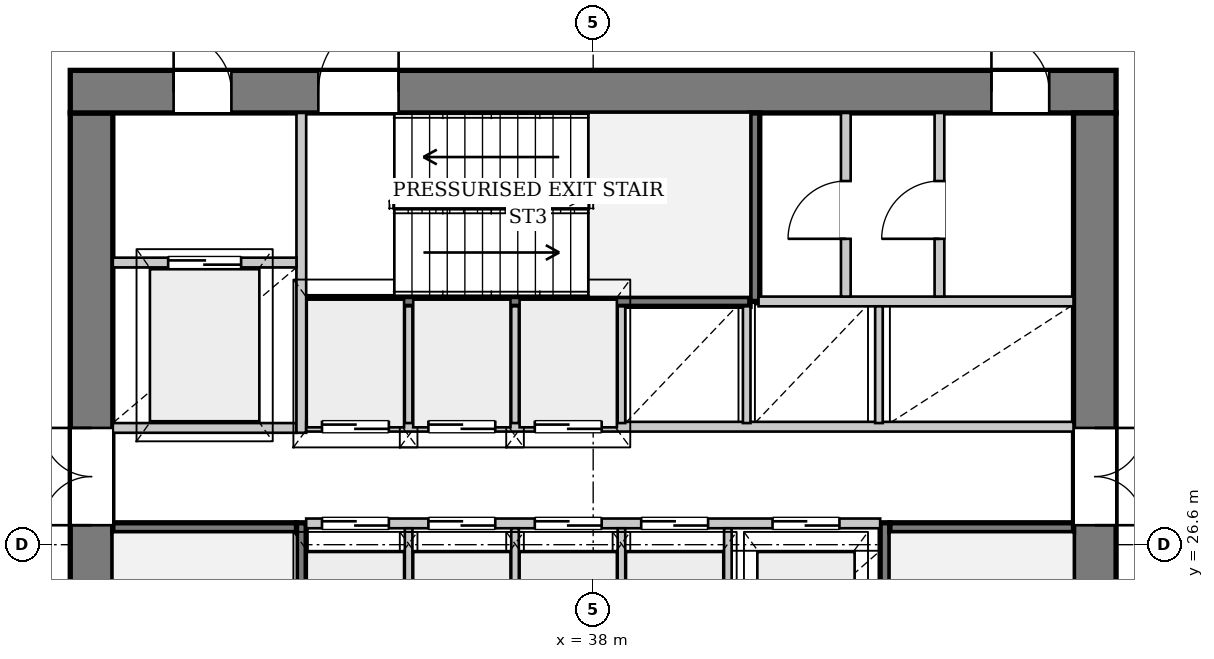
"""IFC4 building model, lengths in metres.
Left out: names, types, materials, properties, quantities, classifications, styles, units other than length and angle.
Written with IfcOpenShell. Run it as: python <this file> out.ifc"""

import sys

from ifc_helpers import new_model, si_unit, direction, frame, frame_2d, origin, place, context, subcontext, project, spatial, rectangle, extrude, source, transform, mapped, element, fill, save


model = new_model("IFC4")
c1 = context("Model", 3, precision=1e-05, world=origin(), true_north=direction((0.0, 1.0)))
c2 = subcontext(c1, "Body", "Model", "MODEL_VIEW")
j1 = project(units=[si_unit("LENGTHUNIT", "METRE"), si_unit("PLANEANGLEUNIT", "RADIAN")], contexts=[c1])
p1 = place(None, origin())
s1 = spatial("IfcSite", under=j1, at=p1, CompositionType="ELEMENT")
p2 = place(p1, origin())
s2 = spatial("IfcBuilding", under=s1, at=p2, CompositionType="ELEMENT")
p3 = place(p2, frame((0.0, 0.0, 134.1)))
s3 = spatial("IfcBuildingStorey", under=s2, at=p3, CompositionType="ELEMENT", Elevation=134.1)
p4 = place(p3, frame((29.75, 19.5, 0.0), z_axis=(0.0, 0.0, 1.0), x_axis=(0.0, 1.0, 0.0)))
e1 = element("IfcWall", 1, at=p4, inside=s3, PredefinedType="SHEAR", context=c2, shape_type="SweptSolid", body=[
    extrude(rectangle(XDim=14.2, YDim=0.7, at=frame_2d((7.1, 0.0))), origin(), (0.0, 0.0, 1.0), 3.75),
])
p5 = place(p4, frame((7.42, 0.0, 0.0)))
e2 = element("IfcOpeningElement", 2, at=p5, cuts=e1, PredefinedType="OPENING", context=c2, shape_type="SweptSolid", body=[
    extrude(rectangle(XDim=1.6, YDim=2.2, at=frame_2d((0.8, 1.1))), frame((0.0, 0.36, 0.0), z_axis=(0.0, -1.0, 0.0), x_axis=(1.0, 0.0, 0.0)), (0.0, 0.0, 1.0), 0.72),
])
p6 = place(p3, frame((29.4, 34.05, 0.0), z_axis=(0.0, 0.0, 1.0), x_axis=(1.0, 0.0, 0.0)))
e3 = element("IfcWall", 3, at=p6, inside=s3, PredefinedType="SHEAR", context=c2, shape_type="SweptSolid", body=[
    extrude(rectangle(XDim=17.2, YDim=0.7, at=frame_2d((8.6, 0.0))), origin(), (0.0, 0.0, 1.0), 3.75),
])
p7 = place(p6, frame((1.7, 0.0, 0.0)))
e4 = element("IfcOpeningElement", 4, at=p7, cuts=e3, PredefinedType="OPENING", context=c2, shape_type="SweptSolid", body=[
    extrude(rectangle(XDim=0.95, YDim=2.1, at=frame_2d((0.475, 1.05))), frame((0.0, 0.36, 0.0), z_axis=(0.0, -1.0, 0.0), x_axis=(1.0, 0.0, 0.0)), (0.0, 0.0, 1.0), 0.72),
])
p8 = place(p6, frame((4.08, 0.0, 0.0)))
e5 = element("IfcOpeningElement", 5, at=p8, cuts=e3, PredefinedType="OPENING", context=c2, shape_type="SweptSolid", body=[
    extrude(rectangle(XDim=1.32, YDim=2.2, at=frame_2d((0.66, 1.1))), frame((0.0, 0.36, 0.0), z_axis=(0.0, -1.0, 0.0), x_axis=(1.0, 0.0, 0.0)), (0.0, 0.0, 1.0), 0.72),
])
p9 = place(p6, frame((15.15, 0.0, 0.0)))
e6 = element("IfcOpeningElement", 6, at=p9, cuts=e3, PredefinedType="OPENING", context=c2, shape_type="SweptSolid", body=[
    extrude(rectangle(XDim=0.95, YDim=2.1, at=frame_2d((0.475, 1.05))), frame((0.0, 0.36, 0.0), z_axis=(0.0, -1.0, 0.0), x_axis=(1.0, 0.0, 0.0)), (0.0, 0.0, 1.0), 0.72),
])
p10 = place(p3, frame((46.25, 33.7, 0.0), z_axis=(0.0, 0.0, 1.0), x_axis=(0.0, -1.0, 0.0)))
e7 = element("IfcWall", 7, at=p10, inside=s3, PredefinedType="SHEAR", context=c2, shape_type="SweptSolid", body=[
    extrude(rectangle(XDim=14.2, YDim=0.7, at=frame_2d((7.1, 0.0))), origin(), (0.0, 0.0, 1.0), 3.75),
])
p11 = place(p10, frame((5.18, 0.0, 0.0)))
e8 = element("IfcOpeningElement", 8, at=p11, cuts=e7, PredefinedType="OPENING", context=c2, shape_type="SweptSolid", body=[
    extrude(rectangle(XDim=1.6, YDim=2.2, at=frame_2d((0.8, 1.1))), frame((0.0, 0.36, 0.0), z_axis=(0.0, -1.0, 0.0), x_axis=(1.0, 0.0, 0.0)), (0.0, 0.0, 1.0), 0.72),
])
p12 = place(p3, frame((33.2, 19.5, 0.0), z_axis=(0.0, 0.0, 1.0), x_axis=(0.0, 1.0, 0.0)))
e9 = element("IfcWall", 9, at=p12, inside=s3, PredefinedType="PARTITIONING", context=c2, shape_type="SweptSolid", body=[
    extrude(rectangle(XDim=7.46, YDim=0.16, at=frame_2d((3.73, 0.0))), origin(), (0.0, 0.0, 1.0), 3.75),
])
p13 = place(p12, frame((0.08, 0.0, 0.0)))
e10 = element("IfcOpeningElement", 10, at=p13, cuts=e9, PredefinedType="OPENING", context=c2, shape_type="SweptSolid", body=[
    extrude(rectangle(XDim=1.32, YDim=2.2, at=frame_2d((0.66, 1.1))), frame((0.0, 0.09, 0.0), z_axis=(0.0, -1.0, 0.0), x_axis=(1.0, 0.0, 0.0)), (0.0, 0.0, 1.0), 0.18),
])
p14 = place(p3, frame((30.1, 26.88, 0.0), z_axis=(0.0, 0.0, 1.0), x_axis=(1.0, 0.0, 0.0)))
e11 = element("IfcWall", 11, at=p14, inside=s3, PredefinedType="PARTITIONING", context=c2, shape_type="SweptSolid", body=[
    extrude(rectangle(XDim=3.02, YDim=0.16, at=frame_2d((1.51, 0.0))), origin(), (0.0, 0.0, 1.0), 3.75),
])
p15 = place(p3, frame((42.8, 26.96, 0.0), z_axis=(0.0, 0.0, 1.0), x_axis=(0.0, -1.0, 0.0)))
e12 = element("IfcWall", 12, at=p15, inside=s3, PredefinedType="PARTITIONING", context=c2, shape_type="SweptSolid", body=[
    extrude(rectangle(XDim=7.46, YDim=0.16, at=frame_2d((3.73, 0.0))), origin(), (0.0, 0.0, 1.0), 3.75),
])
p16 = place(p15, frame((6.06, 0.0, 0.0)))
e13 = element("IfcOpeningElement", 13, at=p16, cuts=e12, PredefinedType="OPENING", context=c2, shape_type="SweptSolid", body=[
    extrude(rectangle(XDim=1.32, YDim=2.2, at=frame_2d((0.66, 1.1))), frame((0.0, 0.09, 0.0), z_axis=(0.0, -1.0, 0.0), x_axis=(1.0, 0.0, 0.0)), (0.0, 0.0, 1.0), 0.18),
])
p17 = place(p3, frame((42.88, 26.88, 0.0), z_axis=(0.0, 0.0, 1.0), x_axis=(1.0, 0.0, 0.0)))
e14 = element("IfcWall", 14, at=p17, inside=s3, PredefinedType="PARTITIONING", context=c2, shape_type="SweptSolid", body=[
    extrude(rectangle(XDim=3.02, YDim=0.16, at=frame_2d((1.51, 0.0))), origin(), (0.0, 0.0, 1.0), 3.75),
])
p18 = place(p3, frame((33.28, 30.6, 0.0), z_axis=(0.0, 0.0, 1.0), x_axis=(1.0, 0.0, 0.0)))
e15 = element("IfcWall", 15, at=p18, inside=s3, PredefinedType="PARTITIONING", context=c2, shape_type="SweptSolid", body=[
    extrude(rectangle(XDim=7.3, YDim=0.16, at=frame_2d((3.65, 0.0))), origin(), (0.0, 0.0, 1.0), 3.75),
])
p19 = place(p3, frame((40.66, 30.6, 0.0), z_axis=(0.0, 0.0, 1.0), x_axis=(0.0, 1.0, 0.0)))
e16 = element("IfcWall", 16, at=p19, inside=s3, PredefinedType="PARTITIONING", context=c2, shape_type="SweptSolid", body=[
    extrude(rectangle(XDim=3.1, YDim=0.16, at=frame_2d((1.55, 0.0))), origin(), (0.0, 0.0, 1.0), 3.75),
])
p20 = place(p3, frame((30.1, 28.52, 0.0), z_axis=(0.0, 0.0, 1.0), x_axis=(1.0, 0.0, 0.0)))
e17 = element("IfcWall", 17, at=p20, inside=s3, PredefinedType="PARTITIONING", context=c2, shape_type="SweptSolid", body=[
    extrude(rectangle(XDim=3.02, YDim=0.16, at=frame_2d((1.51, 0.0))), origin(), (0.0, 0.0, 1.0), 3.75),
])
p21 = place(p3, frame((33.2, 28.44, 0.0), z_axis=(0.0, 0.0, 1.0), x_axis=(0.0, 1.0, 0.0)))
e18 = element("IfcWall", 18, at=p21, inside=s3, PredefinedType="PARTITIONING", context=c2, shape_type="SweptSolid", body=[
    extrude(rectangle(XDim=5.26, YDim=0.16, at=frame_2d((2.63, 0.0))), origin(), (0.0, 0.0, 1.0), 3.75),
])
p22 = place(p3, frame((30.1, 31.24, 0.0), z_axis=(0.0, 0.0, 1.0), x_axis=(1.0, 0.0, 0.0)))
e19 = element("IfcWall", 19, at=p22, inside=s3, PredefinedType="PARTITIONING", context=c2, shape_type="SweptSolid", body=[
    extrude(rectangle(XDim=3.02, YDim=0.16, at=frame_2d((1.51, 0.0))), origin(), (0.0, 0.0, 1.0), 3.75),
])
p23 = place(p22, frame((0.91, 0.0, 0.0)))
e20 = element("IfcOpeningElement", 20, at=p23, cuts=e19, PredefinedType="OPENING", context=c2, shape_type="SweptSolid", body=[
    extrude(rectangle(XDim=1.2, YDim=2.2, at=frame_2d((0.6, 1.1))), frame((0.0, 0.09, 0.0), z_axis=(0.0, -1.0, 0.0), x_axis=(1.0, 0.0, 0.0)), (0.0, 0.0, 1.0), 0.18),
])
p24 = place(p3, frame((33.28, 26.95, 0.0), z_axis=(0.0, 0.0, 1.0), x_axis=(1.0, 0.0, 0.0)))
e21 = element("IfcWall", 21, at=p24, inside=s3, PredefinedType="PARTITIONING", context=c2, shape_type="SweptSolid", body=[
    extrude(rectangle(XDim=9.44, YDim=0.16, at=frame_2d((4.72, 0.0))), origin(), (0.0, 0.0, 1.0), 3.75),
])
p25 = place(p24, frame((0.26, 0.0, 0.0)))
e22 = element("IfcOpeningElement", 22, at=p25, cuts=e21, PredefinedType="OPENING", context=c2, shape_type="SweptSolid", body=[
    extrude(rectangle(XDim=1.1, YDim=2.2, at=frame_2d((0.55, 1.1))), frame((0.0, 0.09, 0.0), z_axis=(0.0, -1.0, 0.0), x_axis=(1.0, 0.0, 0.0)), (0.0, 0.0, 1.0), 0.18),
])
p26 = place(p24, frame((2.01, 0.0, 0.0)))
e23 = element("IfcOpeningElement", 23, at=p26, cuts=e21, PredefinedType="OPENING", context=c2, shape_type="SweptSolid", body=[
    extrude(rectangle(XDim=1.1, YDim=2.2, at=frame_2d((0.55, 1.1))), frame((0.0, 0.09, 0.0), z_axis=(0.0, -1.0, 0.0), x_axis=(1.0, 0.0, 0.0)), (0.0, 0.0, 1.0), 0.18),
])
p27 = place(p24, frame((3.76, 0.0, 0.0)))
e24 = element("IfcOpeningElement", 24, at=p27, cuts=e21, PredefinedType="OPENING", context=c2, shape_type="SweptSolid", body=[
    extrude(rectangle(XDim=1.1, YDim=2.2, at=frame_2d((0.55, 1.1))), frame((0.0, 0.09, 0.0), z_axis=(0.0, -1.0, 0.0), x_axis=(1.0, 0.0, 0.0)), (0.0, 0.0, 1.0), 0.18),
])
p28 = place(p24, frame((5.51, 0.0, 0.0)))
e25 = element("IfcOpeningElement", 25, at=p28, cuts=e21, PredefinedType="OPENING", context=c2, shape_type="SweptSolid", body=[
    extrude(rectangle(XDim=1.1, YDim=2.2, at=frame_2d((0.55, 1.1))), frame((0.0, 0.09, 0.0), z_axis=(0.0, -1.0, 0.0), x_axis=(1.0, 0.0, 0.0)), (0.0, 0.0, 1.0), 0.18),
])
p29 = place(p24, frame((7.67, 0.0, 0.0)))
e26 = element("IfcOpeningElement", 26, at=p29, cuts=e21, PredefinedType="OPENING", context=c2, shape_type="SweptSolid", body=[
    extrude(rectangle(XDim=1.1, YDim=2.2, at=frame_2d((0.55, 1.1))), frame((0.0, 0.09, 0.0), z_axis=(0.0, -1.0, 0.0), x_axis=(1.0, 0.0, 0.0)), (0.0, 0.0, 1.0), 0.18),
])
for number, where, z_axis, x_axis in (
    (27, (34.965, 24.56, 0.0), (0.0, 0.0, 1.0), (0.0, 1.0, 0.0)),
    (28, (36.715, 24.56, 0.0), (0.0, 0.0, 1.0), (0.0, 1.0, 0.0)),
    (29, (38.465, 24.56, 0.0), (0.0, 0.0, 1.0), (0.0, 1.0, 0.0)),
    (30, (40.215, 24.56, 0.0), (0.0, 0.0, 1.0), (0.0, 1.0, 0.0)),
):
    element("IfcWall", number, at=place(p3, frame(where, z_axis=z_axis, x_axis=x_axis)), inside=s3, PredefinedType="PARTITIONING", context=c2, shape_type="SweptSolid", body=[
        extrude(rectangle(XDim=2.31, YDim=0.125, at=frame_2d((1.155, 0.0))), origin(), (0.0, 0.0, 1.0), 3.75),
    ])
p30 = place(p3, frame((33.28, 28.54, 0.0), z_axis=(0.0, 0.0, 1.0), x_axis=(1.0, 0.0, 0.0)))
e31 = element("IfcWall", 31, at=p30, inside=s3, PredefinedType="PARTITIONING", context=c2, shape_type="SweptSolid", body=[
    extrude(rectangle(XDim=12.62, YDim=0.16, at=frame_2d((6.31, 0.0))), origin(), (0.0, 0.0, 1.0), 3.75),
])
p31 = place(p30, frame((0.26, 0.0, 0.0)))
e32 = element("IfcOpeningElement", 32, at=p31, cuts=e31, PredefinedType="OPENING", context=c2, shape_type="SweptSolid", body=[
    extrude(rectangle(XDim=1.1, YDim=2.2, at=frame_2d((0.55, 1.1))), frame((0.0, 0.09, 0.0), z_axis=(0.0, -1.0, 0.0), x_axis=(1.0, 0.0, 0.0)), (0.0, 0.0, 1.0), 0.18),
])
p32 = place(p30, frame((2.01, 0.0, 0.0)))
e33 = element("IfcOpeningElement", 33, at=p32, cuts=e31, PredefinedType="OPENING", context=c2, shape_type="SweptSolid", body=[
    extrude(rectangle(XDim=1.1, YDim=2.2, at=frame_2d((0.55, 1.1))), frame((0.0, 0.09, 0.0), z_axis=(0.0, -1.0, 0.0), x_axis=(1.0, 0.0, 0.0)), (0.0, 0.0, 1.0), 0.18),
])
p33 = place(p30, frame((3.76, 0.0, 0.0)))
e34 = element("IfcOpeningElement", 34, at=p33, cuts=e31, PredefinedType="OPENING", context=c2, shape_type="SweptSolid", body=[
    extrude(rectangle(XDim=1.1, YDim=2.2, at=frame_2d((0.55, 1.1))), frame((0.0, 0.09, 0.0), z_axis=(0.0, -1.0, 0.0), x_axis=(1.0, 0.0, 0.0)), (0.0, 0.0, 1.0), 0.18),
])
p34 = place(p3, frame((40.72, 30.6, 0.0), z_axis=(0.0, 0.0, 1.0), x_axis=(1.0, 0.0, 0.0)))
e35 = element("IfcWall", 35, at=p34, inside=s3, PredefinedType="PARTITIONING", context=c2, shape_type="SweptSolid", body=[
    extrude(rectangle(XDim=5.18, YDim=0.16, at=frame_2d((2.59, 0.0))), origin(), (0.0, 0.0, 1.0), 3.75),
])
for number, where, z_axis, x_axis in (
    (36, (34.965, 28.6, 0.0), (0.0, 0.0, 1.0), (0.0, 1.0, 0.0)),
    (37, (36.715, 28.6, 0.0), (0.0, 0.0, 1.0), (0.0, 1.0, 0.0)),
    (38, (38.465, 28.6, 0.0), (0.0, 0.0, 1.0), (0.0, 1.0, 0.0)),
    (39, (40.525, 28.6, 0.0), (0.0, 0.0, 1.0), (0.0, 1.0, 0.0)),
    (40, (42.7, 28.6, 0.0), (0.0, 0.0, 1.0), (0.0, 1.0, 0.0)),
):
    element("IfcWall", number, at=place(p3, frame(where, z_axis=z_axis, x_axis=x_axis)), inside=s3, PredefinedType="PARTITIONING", context=c2, shape_type="SweptSolid", body=[
        extrude(rectangle(XDim=1.92, YDim=0.125, at=frame_2d((0.96, 0.0))), origin(), (0.0, 0.0, 1.0), 3.75),
    ])
p35 = place(p3, frame((42.155, 30.68, 0.0), z_axis=(0.0, 0.0, 1.0), x_axis=(0.0, 1.0, 0.0)))
e41 = element("IfcWall", 41, at=p35, inside=s3, PredefinedType="PARTITIONING", context=c2, shape_type="SweptSolid", body=[
    extrude(rectangle(XDim=3.02, YDim=0.16, at=frame_2d((1.51, 0.0))), origin(), (0.0, 0.0, 1.0), 3.75),
])
p36 = place(p35, frame((0.95, 0.0, 0.0)))
e42 = element("IfcOpeningElement", 42, at=p36, cuts=e41, PredefinedType="OPENING", context=c2, shape_type="SweptSolid", body=[
    extrude(rectangle(XDim=0.95, YDim=2.1, at=frame_2d((0.475, 1.05))), frame((0.0, 0.09, 0.0), z_axis=(0.0, -1.0, 0.0), x_axis=(1.0, 0.0, 0.0)), (0.0, 0.0, 1.0), 0.18),
])
p37 = place(p3, frame((43.695, 30.68, 0.0), z_axis=(0.0, 0.0, 1.0), x_axis=(0.0, 1.0, 0.0)))
e43 = element("IfcWall", 43, at=p37, inside=s3, PredefinedType="PARTITIONING", context=c2, shape_type="SweptSolid", body=[
    extrude(rectangle(XDim=3.02, YDim=0.16, at=frame_2d((1.51, 0.0))), origin(), (0.0, 0.0, 1.0), 3.75),
])
p38 = place(p37, frame((0.95, 0.0, 0.0)))
e44 = element("IfcOpeningElement", 44, at=p38, cuts=e43, PredefinedType="OPENING", context=c2, shape_type="SweptSolid", body=[
    extrude(rectangle(XDim=0.95, YDim=2.1, at=frame_2d((0.475, 1.05))), frame((0.0, 0.09, 0.0), z_axis=(0.0, -1.0, 0.0), x_axis=(1.0, 0.0, 0.0)), (0.0, 0.0, 1.0), 0.18),
])
m1 = source(origin(), c2, "Body", "SweptSolid", [
    extrude(rectangle(XDim=1.6, YDim=2.2, at=frame_2d((0.8, 1.1))), frame((0.0, 0.025, 0.0), z_axis=(0.0, -1.0, 0.0), x_axis=(1.0, 0.0, 0.0)), (0.0, 0.0, 1.0), 0.05),
])
p39 = place(p5, origin())
e45 = element("IfcDoor", 45, at=p39, inside=s3, OperationType="DOUBLE_DOOR_SINGLE_SWING", PredefinedType="DOOR", context=c2, shape_type="MappedRepresentation", body=[
    mapped(m1, transform((0.0, 0.0, 0.0), x_axis=(1.0, 0.0, 0.0), y_axis=(0.0, 1.0, 0.0), z_axis=(0.0, 0.0, 1.0), scale=1.0)),
])
fill(e2, e45)
m2 = source(origin(), c2, "Body", "SweptSolid", [
    extrude(rectangle(XDim=0.95, YDim=2.1, at=frame_2d((0.475, 1.05))), frame((0.0, 0.025, 0.0), z_axis=(0.0, -1.0, 0.0), x_axis=(1.0, 0.0, 0.0)), (0.0, 0.0, 1.0), 0.05),
])
p40 = place(p7, origin())
e46 = element("IfcDoor", 46, at=p40, inside=s3, OperationType="SINGLE_SWING_LEFT", PredefinedType="DOOR", context=c2, shape_type="MappedRepresentation", body=[
    mapped(m2, transform((0.0, 0.0, 0.0), x_axis=(1.0, 0.0, 0.0), y_axis=(0.0, 1.0, 0.0), z_axis=(0.0, 0.0, 1.0), scale=1.0)),
])
fill(e4, e46)
m3 = source(origin(), c2, "Body", "SweptSolid", [
    extrude(rectangle(XDim=1.32, YDim=2.2, at=frame_2d((0.66, 1.1))), frame((0.0, 0.025, 0.0), z_axis=(0.0, -1.0, 0.0), x_axis=(1.0, 0.0, 0.0)), (0.0, 0.0, 1.0), 0.05),
])
p41 = place(p8, origin())
e47 = element("IfcDoor", 47, at=p41, inside=s3, OperationType="SINGLE_SWING_RIGHT", PredefinedType="DOOR", context=c2, shape_type="MappedRepresentation", body=[
    mapped(m3, transform((0.0, 0.0, 0.0), x_axis=(1.0, 0.0, 0.0), y_axis=(0.0, 1.0, 0.0), z_axis=(0.0, 0.0, 1.0), scale=1.0)),
])
fill(e5, e47)
p42 = place(p11, origin())
e48 = element("IfcDoor", 48, at=p42, inside=s3, OperationType="DOUBLE_DOOR_SINGLE_SWING", PredefinedType="DOOR", context=c2, shape_type="MappedRepresentation", body=[
    mapped(m1, transform((0.0, 0.0, 0.0), x_axis=(1.0, 0.0, 0.0), y_axis=(0.0, 1.0, 0.0), z_axis=(0.0, 0.0, 1.0), scale=1.0)),
])
fill(e8, e48)
m4 = source(origin(), c2, "Body", "SweptSolid", [
    extrude(rectangle(XDim=1.2, YDim=2.2, at=frame_2d((0.6, 1.1))), frame((0.0, 0.025, 0.0), z_axis=(0.0, -1.0, 0.0), x_axis=(1.0, 0.0, 0.0)), (0.0, 0.0, 1.0), 0.05),
])
p43 = place(p23, origin())
e49 = element("IfcDoor", 49, at=p43, inside=s3, OperationType="DOUBLE_DOOR_SLIDING", PredefinedType="DOOR", context=c2, shape_type="MappedRepresentation", body=[
    mapped(m4, transform((0.0, 0.0, 0.0), x_axis=(1.0, 0.0, 0.0), y_axis=(0.0, 1.0, 0.0), z_axis=(0.0, 0.0, 1.0), scale=1.0)),
])
fill(e20, e49)
m5 = source(origin(), c2, "Body", "SweptSolid", [
    extrude(rectangle(XDim=1.1, YDim=2.2, at=frame_2d((0.55, 1.1))), frame((0.0, 0.025, 0.0), z_axis=(0.0, -1.0, 0.0), x_axis=(1.0, 0.0, 0.0)), (0.0, 0.0, 1.0), 0.05),
])
p44 = place(p25, origin())
e50 = element("IfcDoor", 50, at=p44, inside=s3, OperationType="DOUBLE_DOOR_SLIDING", PredefinedType="DOOR", context=c2, shape_type="MappedRepresentation", body=[
    mapped(m5, transform((0.0, 0.0, 0.0), x_axis=(1.0, 0.0, 0.0), y_axis=(0.0, 1.0, 0.0), z_axis=(0.0, 0.0, 1.0), scale=1.0)),
])
fill(e22, e50)
p45 = place(p26, origin())
e51 = element("IfcDoor", 51, at=p45, inside=s3, OperationType="DOUBLE_DOOR_SLIDING", PredefinedType="DOOR", context=c2, shape_type="MappedRepresentation", body=[
    mapped(m5, transform((0.0, 0.0, 0.0), x_axis=(1.0, 0.0, 0.0), y_axis=(0.0, 1.0, 0.0), z_axis=(0.0, 0.0, 1.0), scale=1.0)),
])
fill(e23, e51)
p46 = place(p27, origin())
e52 = element("IfcDoor", 52, at=p46, inside=s3, OperationType="DOUBLE_DOOR_SLIDING", PredefinedType="DOOR", context=c2, shape_type="MappedRepresentation", body=[
    mapped(m5, transform((0.0, 0.0, 0.0), x_axis=(1.0, 0.0, 0.0), y_axis=(0.0, 1.0, 0.0), z_axis=(0.0, 0.0, 1.0), scale=1.0)),
])
fill(e24, e52)
p47 = place(p28, origin())
e53 = element("IfcDoor", 53, at=p47, inside=s3, OperationType="DOUBLE_DOOR_SLIDING", PredefinedType="DOOR", context=c2, shape_type="MappedRepresentation", body=[
    mapped(m5, transform((0.0, 0.0, 0.0), x_axis=(1.0, 0.0, 0.0), y_axis=(0.0, 1.0, 0.0), z_axis=(0.0, 0.0, 1.0), scale=1.0)),
])
fill(e25, e53)
p48 = place(p29, origin())
e54 = element("IfcDoor", 54, at=p48, inside=s3, OperationType="DOUBLE_DOOR_SLIDING", PredefinedType="DOOR", context=c2, shape_type="MappedRepresentation", body=[
    mapped(m5, transform((0.0, 0.0, 0.0), x_axis=(1.0, 0.0, 0.0), y_axis=(0.0, 1.0, 0.0), z_axis=(0.0, 0.0, 1.0), scale=1.0)),
])
fill(e26, e54)
p49 = place(p31, origin())
e55 = element("IfcDoor", 55, at=p49, inside=s3, OperationType="DOUBLE_DOOR_SLIDING", PredefinedType="DOOR", context=c2, shape_type="MappedRepresentation", body=[
    mapped(m5, transform((0.0, 0.0, 0.0), x_axis=(1.0, 0.0, 0.0), y_axis=(0.0, 1.0, 0.0), z_axis=(0.0, 0.0, 1.0), scale=1.0)),
])
fill(e32, e55)
p50 = place(p32, origin())
e56 = element("IfcDoor", 56, at=p50, inside=s3, OperationType="DOUBLE_DOOR_SLIDING", PredefinedType="DOOR", context=c2, shape_type="MappedRepresentation", body=[
    mapped(m5, transform((0.0, 0.0, 0.0), x_axis=(1.0, 0.0, 0.0), y_axis=(0.0, 1.0, 0.0), z_axis=(0.0, 0.0, 1.0), scale=1.0)),
])
fill(e33, e56)
p51 = place(p33, origin())
e57 = element("IfcDoor", 57, at=p51, inside=s3, OperationType="DOUBLE_DOOR_SLIDING", PredefinedType="DOOR", context=c2, shape_type="MappedRepresentation", body=[
    mapped(m5, transform((0.0, 0.0, 0.0), x_axis=(1.0, 0.0, 0.0), y_axis=(0.0, 1.0, 0.0), z_axis=(0.0, 0.0, 1.0), scale=1.0)),
])
fill(e34, e57)
p52 = place(p36, origin())
e58 = element("IfcDoor", 58, at=p52, inside=s3, OperationType="SINGLE_SWING_LEFT", PredefinedType="DOOR", context=c2, shape_type="MappedRepresentation", body=[
    mapped(m2, transform((0.0, 0.0, 0.0), x_axis=(1.0, 0.0, 0.0), y_axis=(0.0, 1.0, 0.0), z_axis=(0.0, 0.0, 1.0), scale=1.0)),
])
fill(e42, e58)
p53 = place(p38, origin())
e59 = element("IfcDoor", 59, at=p53, inside=s3, OperationType="SINGLE_SWING_LEFT", PredefinedType="DOOR", context=c2, shape_type="MappedRepresentation", body=[
    mapped(m2, transform((0.0, 0.0, 0.0), x_axis=(1.0, 0.0, 0.0), y_axis=(0.0, 1.0, 0.0), z_axis=(0.0, 0.0, 1.0), scale=1.0)),
])
fill(e44, e59)
p54 = place(p9, origin())
e60 = element("IfcDoor", 60, at=p54, inside=s3, OperationType="SINGLE_SWING_LEFT", PredefinedType="DOOR", context=c2, shape_type="MappedRepresentation", body=[
    mapped(m2, transform((0.0, 0.0, 0.0), x_axis=(1.0, 0.0, 0.0), y_axis=(0.0, 1.0, 0.0), z_axis=(0.0, 0.0, 1.0), scale=1.0)),
])
fill(e6, e60)
save(model, sys.argv[1])
